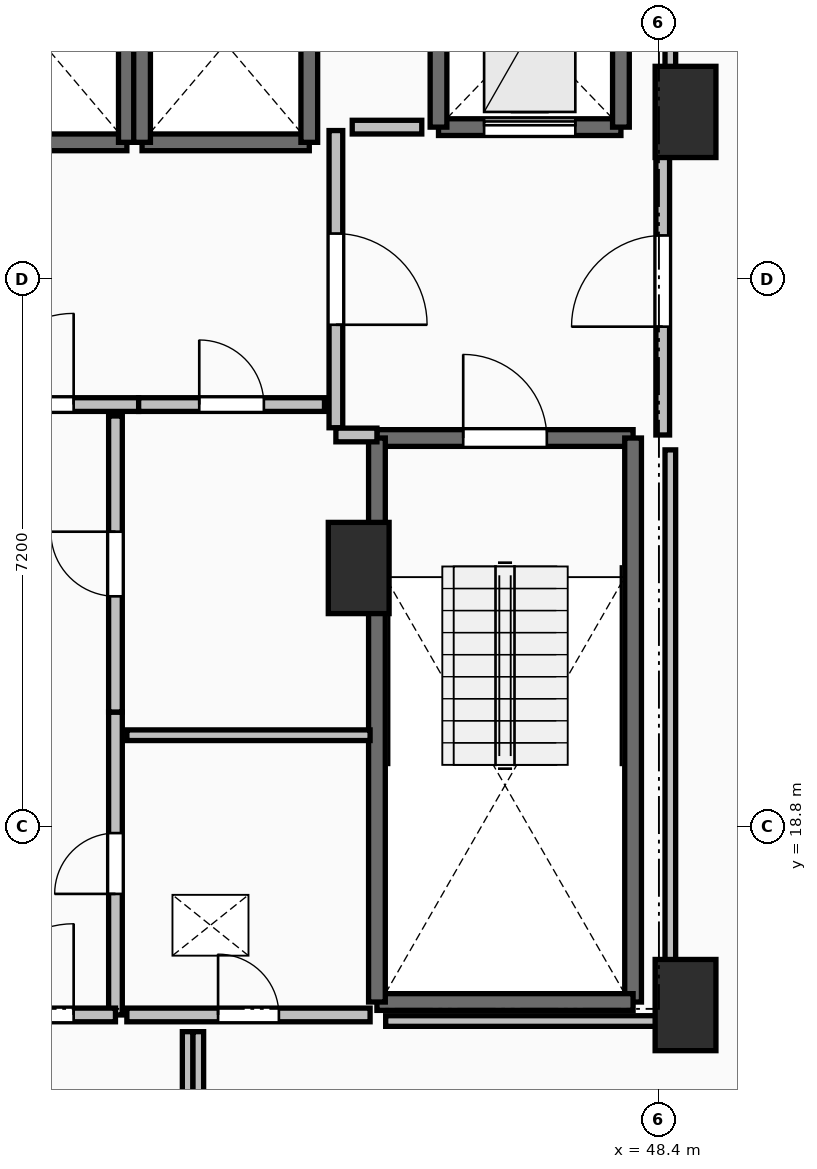
"""IFC4 building model, lengths in metres.
Left out: names, types, materials, properties, quantities, classifications, styles, units other than length and angle.
Written with IfcOpenShell. Run it as: python <this file> out.ifc"""

import sys

from ifc_helpers import new_model, si_unit, direction, frame, frame_2d, origin, origin_2d, place, context, subcontext, project, spatial, rectangle, extrude, element, fill, save


model = new_model("IFC4")
c1 = context("Model", 3, precision=1e-05, world=origin(), true_north=direction((0.0, 1.0)))
c2 = subcontext(c1, "Body", "Model", "MODEL_VIEW")
j1 = project(units=[si_unit("LENGTHUNIT", "METRE"), si_unit("PLANEANGLEUNIT", "RADIAN")], contexts=[c1])
p1 = place(None, origin())
s1 = spatial("IfcSite", under=j1, at=p1, CompositionType="ELEMENT")
p2 = place(p1, origin())
s2 = spatial("IfcBuilding", under=s1, at=p2, CompositionType="ELEMENT")
p3 = place(p2, frame((0.0, 0.0, 136.1)))
s3 = spatial("IfcBuildingStorey", under=s2, at=p3, CompositionType="ELEMENT", Elevation=136.1)
for number, where, z_axis, x_axis in (
    (1, (48.75, 28.2, 0.0), (0.0, 0.0, 1.0), (1.0, 0.0, 0.0)),
    (2, (48.75, 16.45, 0.0), (0.0, 0.0, 1.0), (1.0, 0.0, 0.0)),
    (3, (44.45, 22.2, 0.0), (0.0, 0.0, 1.0), (1.0, 0.0, 0.0)),
):
    element("IfcColumn", number, at=place(p3, frame(where, z_axis=z_axis, x_axis=x_axis)), inside=s3, PredefinedType="PILASTER", context=c2, shape_type="SweptSolid", body=[
        extrude(rectangle(XDim=0.8, YDim=1.2, at=origin_2d()), origin(), (0.0, 0.0, 1.0), 3.5),
    ])
p4 = place(p3, frame((44.69, 23.91, 0.0), z_axis=(0.0, 0.0, 1.0), x_axis=(1.0, 0.0, 0.0)))
e4 = element("IfcWall", 4, at=p4, inside=s3, PredefinedType="SOLIDWALL", context=c2, shape_type="SweptSolid", body=[
    extrude(rectangle(XDim=3.37, YDim=0.22, at=frame_2d((1.685, 0.0))), origin(), (0.0, 0.0, 1.0), 3.24),
])
p5 = place(p4, frame((1.135, 0.0, 0.0)))
e5 = element("IfcOpeningElement", 5, at=p5, cuts=e4, PredefinedType="OPENING", context=c2, shape_type="SweptSolid", body=[
    extrude(rectangle(XDim=1.1, YDim=2.15, at=frame_2d((0.55, 1.075))), frame((0.0, 0.125, 0.0), z_axis=(0.0, -1.0, 0.0), x_axis=(1.0, 0.0, 0.0)), (0.0, 0.0, 1.0), 0.25),
])
p6 = place(p3, frame((48.06, 23.91, 0.0), z_axis=(0.0, 0.0, 1.0), x_axis=(0.0, -1.0, 0.0)))
e6 = element("IfcWall", 6, at=p6, inside=s3, PredefinedType="SOLIDWALL", context=c2, shape_type="SweptSolid", body=[
    extrude(rectangle(XDim=7.42, YDim=0.22, at=frame_2d((3.71, 0.0))), origin(), (0.0, 0.0, 1.0), 3.24),
])
p7 = place(p3, frame((48.06, 16.49, 0.0), z_axis=(0.0, 0.0, 1.0), x_axis=(-1.0, 0.0, 0.0)))
e7 = element("IfcWall", 7, at=p7, inside=s3, PredefinedType="SOLIDWALL", context=c2, shape_type="SweptSolid", body=[
    extrude(rectangle(XDim=3.37, YDim=0.22, at=frame_2d((1.685, 0.0))), origin(), (0.0, 0.0, 1.0), 3.24),
])
p8 = place(p3, frame((44.69, 16.49, 0.0), z_axis=(0.0, 0.0, 1.0), x_axis=(0.0, 1.0, 0.0)))
e8 = element("IfcWall", 8, at=p8, inside=s3, PredefinedType="SOLIDWALL", context=c2, shape_type="SweptSolid", body=[
    extrude(rectangle(XDim=7.42, YDim=0.22, at=frame_2d((3.71, 0.0))), origin(), (0.0, 0.0, 1.0), 3.24),
])
p9 = place(p3, frame((39.2, 27.8, 0.0), z_axis=(0.0, 0.0, 1.0), x_axis=(1.0, 0.0, 0.0)))
e9 = element("IfcWall", 9, at=p9, inside=s3, PredefinedType="SOLIDWALL", context=c2, shape_type="SweptSolid", body=[
    extrude(rectangle(XDim=2.2, YDim=0.22, at=frame_2d((1.1, 0.0))), origin(), (0.0, 0.0, 1.0), 3.24),
])
p10 = place(p3, frame((41.4, 27.8, 0.0), z_axis=(0.0, 0.0, 1.0), x_axis=(0.0, 1.0, 0.0)))
e10 = element("IfcWall", 10, at=p10, inside=s3, PredefinedType="SOLIDWALL", context=c2, shape_type="SweptSolid", body=[
    extrude(rectangle(XDim=2.6, YDim=0.22, at=frame_2d((1.3, 0.0))), origin(), (0.0, 0.0, 1.0), 3.24),
])
p11 = place(p3, frame((41.6, 27.8, 0.0), z_axis=(0.0, 0.0, 1.0), x_axis=(1.0, 0.0, 0.0)))
e11 = element("IfcWall", 11, at=p11, inside=s3, PredefinedType="SOLIDWALL", context=c2, shape_type="SweptSolid", body=[
    extrude(rectangle(XDim=2.2, YDim=0.22, at=frame_2d((1.1, 0.0))), origin(), (0.0, 0.0, 1.0), 3.24),
])
for number, where, z_axis, x_axis in (
    (12, (43.8, 27.8, 0.0), (0.0, 0.0, 1.0), (0.0, 1.0, 0.0)),
    (13, (41.6, 30.4, 0.0), (0.0, 0.0, 1.0), (0.0, -1.0, 0.0)),
):
    element("IfcWall", number, at=place(p3, frame(where, z_axis=z_axis, x_axis=x_axis)), inside=s3, PredefinedType="SOLIDWALL", context=c2, shape_type="SweptSolid", body=[
        extrude(rectangle(XDim=2.6, YDim=0.22, at=frame_2d((1.3, 0.0))), origin(), (0.0, 0.0, 1.0), 3.24),
    ])
p12 = place(p3, frame((45.5, 28.0, 0.0), z_axis=(0.0, 0.0, 1.0), x_axis=(1.0, 0.0, 0.0)))
e14 = element("IfcWall", 14, at=p12, inside=s3, PredefinedType="SHEAR", context=c2, shape_type="SweptSolid", body=[
    extrude(rectangle(XDim=2.4, YDim=0.22, at=frame_2d((1.2, 0.0))), origin(), (0.0, 0.0, 1.0), 3.24),
])
p13 = place(p12, frame((0.6, 0.0, 0.0)))
e15 = element("IfcOpeningElement", 15, at=p13, cuts=e14, PredefinedType="OPENING", context=c2, shape_type="SweptSolid", body=[
    extrude(rectangle(XDim=1.2, YDim=2.2, at=frame_2d((0.6, 1.1))), frame((0.0, 0.125, 0.0), z_axis=(0.0, -1.0, 0.0), x_axis=(1.0, 0.0, 0.0)), (0.0, 0.0, 1.0), 0.25),
])
for number, where, z_axis, x_axis in (
    (16, (47.9, 28.0, 0.0), (0.0, 0.0, 1.0), (0.0, 1.0, 0.0)),
    (17, (45.5, 30.5, 0.0), (0.0, 0.0, 1.0), (0.0, -1.0, 0.0)),
):
    element("IfcWall", number, at=place(p3, frame(where, z_axis=z_axis, x_axis=x_axis)), inside=s3, PredefinedType="SHEAR", context=c2, shape_type="SweptSolid", body=[
        extrude(rectangle(XDim=2.5, YDim=0.22, at=frame_2d((1.25, 0.0))), origin(), (0.0, 0.0, 1.0), 3.24),
    ])
p14 = place(p3, frame((44.15, 27.955, 0.0), z_axis=(0.0, 0.0, 1.0), x_axis=(0.0, -1.0, 0.0)))
e18 = element("IfcWall", 18, at=p14, inside=s3, PredefinedType="PARTITIONING", context=c2, shape_type="SweptSolid", body=[
    extrude(rectangle(XDim=3.91, YDim=0.18, at=frame_2d((1.955, 0.0))), origin(), (0.0, 0.0, 1.0), 3.24),
])
p15 = place(p14, frame((1.355, 0.0, 0.0)))
e19 = element("IfcOpeningElement", 19, at=p15, cuts=e18, PredefinedType="OPENING", context=c2, shape_type="SweptSolid", body=[
    extrude(rectangle(XDim=1.2, YDim=2.15, at=frame_2d((0.6, 1.075))), frame((0.0, 0.105, 0.0), z_axis=(0.0, -1.0, 0.0), x_axis=(1.0, 0.0, 0.0)), (0.0, 0.0, 1.0), 0.21),
])
p16 = place(p3, frame((44.15, 23.95, 0.0), z_axis=(0.0, 0.0, 1.0), x_axis=(1.0, 0.0, 0.0)))
e20 = element("IfcWall", 20, at=p16, inside=s3, PredefinedType="PARTITIONING", context=c2, shape_type="SweptSolid", body=[
    extrude(rectangle(XDim=0.54, YDim=0.18, at=frame_2d((0.27, 0.0))), origin(), (0.0, 0.0, 1.0), 3.24),
])
p17 = place(p3, frame((48.45, 23.95, 0.0), z_axis=(0.0, 0.0, 1.0), x_axis=(0.0, 1.0, 0.0)))
e21 = element("IfcWall", 21, at=p17, inside=s3, PredefinedType="PARTITIONING", context=c2, shape_type="SweptSolid", body=[
    extrude(rectangle(XDim=4.05, YDim=0.18, at=frame_2d((2.025, 0.0))), origin(), (0.0, 0.0, 1.0), 3.24),
])
p18 = place(p17, frame((1.425, 0.0, 0.0)))
e22 = element("IfcOpeningElement", 22, at=p18, cuts=e21, PredefinedType="OPENING", context=c2, shape_type="SweptSolid", body=[
    extrude(rectangle(XDim=1.2, YDim=2.15, at=frame_2d((0.6, 1.075))), frame((0.0, 0.105, 0.0), z_axis=(0.0, -1.0, 0.0), x_axis=(1.0, 0.0, 0.0)), (0.0, 0.0, 1.0), 0.21),
])
p19 = place(p3, frame((38.645, 24.35, 0.0), z_axis=(0.0, 0.0, 1.0), x_axis=(1.0, 0.0, 0.0)))
e23 = element("IfcWall", 23, at=p19, inside=s3, PredefinedType="PARTITIONING", context=c2, shape_type="SweptSolid", body=[
    extrude(rectangle(XDim=2.91, YDim=0.18, at=frame_2d((1.455, 0.0))), origin(), (0.0, 0.0, 1.0), 3.24),
])
p20 = place(p19, frame((0.855, 0.0, 0.0)))
e24 = element("IfcOpeningElement", 24, at=p20, cuts=e23, PredefinedType="OPENING", context=c2, shape_type="SweptSolid", body=[
    extrude(rectangle(XDim=1.2, YDim=2.15, at=frame_2d((0.6, 1.075))), frame((0.0, 0.105, 0.0), z_axis=(0.0, -1.0, 0.0), x_axis=(1.0, 0.0, 0.0)), (0.0, 0.0, 1.0), 0.21),
])
p21 = place(p3, frame((41.555, 24.35, 0.0), z_axis=(0.0, 0.0, 1.0), x_axis=(1.0, 0.0, 0.0)))
e25 = element("IfcWall", 25, at=p21, inside=s3, PredefinedType="PARTITIONING", context=c2, shape_type="SweptSolid", body=[
    extrude(rectangle(XDim=2.445, YDim=0.18, at=frame_2d((1.223, 0.0))), origin(), (0.0, 0.0, 1.0), 3.24),
])
p22 = place(p21, frame((0.798, 0.0, 0.0)))
e26 = element("IfcOpeningElement", 26, at=p22, cuts=e25, PredefinedType="OPENING", context=c2, shape_type="SweptSolid", body=[
    extrude(rectangle(XDim=0.85, YDim=2.1, at=frame_2d((0.425, 1.05))), frame((0.0, 0.105, 0.0), z_axis=(0.0, -1.0, 0.0), x_axis=(1.0, 0.0, 0.0)), (0.0, 0.0, 1.0), 0.21),
])
p23 = place(p3, frame((41.25, 16.32, 0.0), z_axis=(0.0, 0.0, 1.0), x_axis=(0.0, 1.0, 0.0)))
e27 = element("IfcWall", 27, at=p23, inside=s3, PredefinedType="PARTITIONING", context=c2, shape_type="SweptSolid", body=[
    extrude(rectangle(XDim=3.985, YDim=0.18, at=frame_2d((1.992, 0.0))), origin(), (0.0, 0.0, 1.0), 3.24),
])
p24 = place(p23, frame((1.593, 0.0, 0.0)))
e28 = element("IfcOpeningElement", 28, at=p24, cuts=e27, PredefinedType="OPENING", context=c2, shape_type="SweptSolid", body=[
    extrude(rectangle(XDim=0.8, YDim=2.05, at=frame_2d((0.4, 1.025))), frame((0.0, 0.105, 0.0), z_axis=(0.0, -1.0, 0.0), x_axis=(1.0, 0.0, 0.0)), (0.0, 0.0, 1.0), 0.21),
])
p25 = place(p3, frame((41.25, 20.305, 0.0), z_axis=(0.0, 0.0, 1.0), x_axis=(0.0, 1.0, 0.0)))
e29 = element("IfcWall", 29, at=p25, inside=s3, PredefinedType="PARTITIONING", context=c2, shape_type="SweptSolid", body=[
    extrude(rectangle(XDim=3.895, YDim=0.18, at=frame_2d((1.948, 0.0))), origin(), (0.0, 0.0, 1.0), 3.24),
])
p26 = place(p25, frame((1.522, 0.0, 0.0)))
e30 = element("IfcOpeningElement", 30, at=p26, cuts=e29, PredefinedType="OPENING", context=c2, shape_type="SweptSolid", body=[
    extrude(rectangle(XDim=0.85, YDim=2.1, at=frame_2d((0.425, 1.05))), frame((0.0, 0.105, 0.0), z_axis=(0.0, -1.0, 0.0), x_axis=(1.0, 0.0, 0.0)), (0.0, 0.0, 1.0), 0.21),
])
p27 = place(p3, frame((38.95, 16.32, 0.0), z_axis=(0.0, 0.0, 1.0), x_axis=(1.0, 0.0, 0.0)))
e31 = element("IfcWall", 31, at=p27, inside=s3, PredefinedType="PARTITIONING", context=c2, shape_type="SweptSolid", body=[
    extrude(rectangle(XDim=2.3, YDim=0.18, at=frame_2d((1.15, 0.0))), origin(), (0.0, 0.0, 1.0), 3.24),
])
p28 = place(p27, frame((0.55, 0.0, 0.0)))
e32 = element("IfcOpeningElement", 32, at=p28, cuts=e31, PredefinedType="OPENING", context=c2, shape_type="SweptSolid", body=[
    extrude(rectangle(XDim=1.2, YDim=2.15, at=frame_2d((0.6, 1.075))), frame((0.0, 0.105, 0.0), z_axis=(0.0, -1.0, 0.0), x_axis=(1.0, 0.0, 0.0)), (0.0, 0.0, 1.0), 0.21),
])
p29 = place(p3, frame((44.6, 20.0, 0.0), z_axis=(0.0, 0.0, 1.0), x_axis=(-1.0, 0.0, 0.0)))
e33 = element("IfcWall", 33, at=p29, inside=s3, PredefinedType="PARTITIONING", context=c2, shape_type="SweptSolid", body=[
    extrude(rectangle(XDim=3.2, YDim=0.14, at=frame_2d((1.6, 0.0))), origin(), (0.0, 0.0, 1.0), 3.24),
])
p30 = place(p3, frame((41.4, 16.32, 0.0), z_axis=(0.0, 0.0, 1.0), x_axis=(1.0, 0.0, 0.0)))
e34 = element("IfcWall", 34, at=p30, inside=s3, PredefinedType="PARTITIONING", context=c2, shape_type="SweptSolid", body=[
    extrude(rectangle(XDim=3.2, YDim=0.18, at=frame_2d((1.6, 0.0))), origin(), (0.0, 0.0, 1.0), 3.24),
])
p31 = place(p30, frame((1.2, 0.0, 0.0)))
e35 = element("IfcOpeningElement", 35, at=p31, cuts=e34, PredefinedType="OPENING", context=c2, shape_type="SweptSolid", body=[
    extrude(rectangle(XDim=0.8, YDim=2.05, at=frame_2d((0.4, 1.025))), frame((0.0, 0.105, 0.0), z_axis=(0.0, -1.0, 0.0), x_axis=(1.0, 0.0, 0.0)), (0.0, 0.0, 1.0), 0.21),
])
p32 = place(p3, frame((45.28, 28.0, 0.0), z_axis=(0.0, 0.0, 1.0), x_axis=(-1.0, 0.0, 0.0)))
e36 = element("IfcWall", 36, at=p32, inside=s3, PredefinedType="PARTITIONING", context=c2, shape_type="SweptSolid", body=[
    extrude(rectangle(XDim=0.915, YDim=0.18, at=frame_2d((0.458, 0.0))), origin(), (0.0, 0.0, 1.0), 3.24),
])
p33 = place(p3, frame((48.55, 16.24, 0.0), z_axis=(0.0, 0.0, 1.0), x_axis=(0.0, 1.0, 0.0)))
e37 = element("IfcWall", 37, at=p33, inside=s3, PredefinedType="PARTITIONING", context=c2, shape_type="SweptSolid", body=[
    extrude(rectangle(XDim=7.514, YDim=0.14, at=frame_2d((3.757, 0.0))), origin(), (0.0, 0.0, 1.0), 2.432),
])
p34 = place(p3, frame((48.55, 28.196, 0.0), z_axis=(0.0, 0.0, 1.0), x_axis=(0.0, 1.0, 0.0)))
e38 = element("IfcWall", 38, at=p34, inside=s3, PredefinedType="PARTITIONING", context=c2, shape_type="SweptSolid", body=[
    extrude(rectangle(XDim=5.254, YDim=0.14, at=frame_2d((2.627, 0.0))), origin(), (0.0, 0.0, 1.0), 2.432),
])
for number, where, z_axis, x_axis in (
    (39, (42.2, 16.1, 0.0), (0.0, 0.0, 1.0), (0.0, -1.0, 0.0)),
    (40, (42.34, 14.27, 0.0), (0.0, 0.0, 1.0), (0.0, 1.0, 0.0)),
):
    element("IfcWall", number, at=place(p3, frame(where, z_axis=z_axis, x_axis=x_axis)), inside=s3, PredefinedType="PARTITIONING", context=c2, shape_type="SweptSolid", body=[
        extrude(rectangle(XDim=1.83, YDim=0.14, at=frame_2d((0.915, 0.0))), origin(), (0.0, 0.0, 1.0), 3.24),
    ])
p35 = place(p3, frame((44.805, 16.24, 0.0), z_axis=(0.0, 0.0, 1.0), x_axis=(1.0, 0.0, 0.0)))
e41 = element("IfcWall", 41, at=p35, inside=s3, PredefinedType="PARTITIONING", context=c2, shape_type="SweptSolid", body=[
    extrude(rectangle(XDim=3.745, YDim=0.14, at=frame_2d((1.873, 0.0))), origin(), (0.0, 0.0, 1.0), 2.432),
])
p36 = place(p5, origin())
e42 = element("IfcDoor", 42, at=p36, inside=s3, OperationType="SINGLE_SWING_LEFT", PredefinedType="DOOR", context=c2, shape_type="SweptSolid", body=[
    extrude(rectangle(XDim=1.1, YDim=2.15, at=frame_2d((0.55, 1.075))), frame((0.0, 0.025, 0.0), z_axis=(0.0, -1.0, 0.0), x_axis=(1.0, 0.0, 0.0)), (0.0, 0.0, 1.0), 0.05),
])
fill(e5, e42)
p37 = place(p13, origin())
e43 = element("IfcDoor", 43, at=p37, inside=s3, OperationType="SLIDING_TO_LEFT", PredefinedType="DOOR", context=c2, shape_type="SweptSolid", body=[
    extrude(rectangle(XDim=1.2, YDim=2.2, at=frame_2d((0.6, 1.1))), frame((0.0, 0.025, 0.0), z_axis=(0.0, -1.0, 0.0), x_axis=(1.0, 0.0, 0.0)), (0.0, 0.0, 1.0), 0.05),
])
fill(e15, e43)
p38 = place(p15, origin())
e44 = element("IfcDoor", 44, at=p38, inside=s3, OperationType="SINGLE_SWING_RIGHT", PredefinedType="DOOR", context=c2, shape_type="SweptSolid", body=[
    extrude(rectangle(XDim=1.2, YDim=2.15, at=frame_2d((0.6, 1.075))), frame((0.0, 0.025, 0.0), z_axis=(0.0, -1.0, 0.0), x_axis=(1.0, 0.0, 0.0)), (0.0, 0.0, 1.0), 0.05),
])
fill(e19, e44)
p39 = place(p18, origin())
e45 = element("IfcDoor", 45, at=p39, inside=s3, OperationType="SINGLE_SWING_LEFT", PredefinedType="DOOR", context=c2, shape_type="SweptSolid", body=[
    extrude(rectangle(XDim=1.2, YDim=2.15, at=frame_2d((0.6, 1.075))), frame((0.0, 0.025, 0.0), z_axis=(0.0, -1.0, 0.0), x_axis=(1.0, 0.0, 0.0)), (0.0, 0.0, 1.0), 0.05),
])
fill(e22, e45)
p40 = place(p20, origin())
e46 = element("IfcDoor", 46, at=p40, inside=s3, OperationType="SINGLE_SWING_RIGHT", PredefinedType="DOOR", context=c2, shape_type="SweptSolid", body=[
    extrude(rectangle(XDim=1.2, YDim=2.15, at=frame_2d((0.6, 1.075))), frame((0.0, 0.025, 0.0), z_axis=(0.0, -1.0, 0.0), x_axis=(1.0, 0.0, 0.0)), (0.0, 0.0, 1.0), 0.05),
])
fill(e24, e46)
p41 = place(p22, origin())
e47 = element("IfcDoor", 47, at=p41, inside=s3, OperationType="SINGLE_SWING_LEFT", PredefinedType="DOOR", context=c2, shape_type="SweptSolid", body=[
    extrude(rectangle(XDim=0.85, YDim=2.1, at=frame_2d((0.425, 1.05))), frame((0.0, 0.025, 0.0), z_axis=(0.0, -1.0, 0.0), x_axis=(1.0, 0.0, 0.0)), (0.0, 0.0, 1.0), 0.05),
])
fill(e26, e47)
p42 = place(p24, origin())
e48 = element("IfcDoor", 48, at=p42, inside=s3, OperationType="SINGLE_SWING_LEFT", PredefinedType="DOOR", context=c2, shape_type="SweptSolid", body=[
    extrude(rectangle(XDim=0.8, YDim=2.05, at=frame_2d((0.4, 1.025))), frame((0.0, 0.025, 0.0), z_axis=(0.0, -1.0, 0.0), x_axis=(1.0, 0.0, 0.0)), (0.0, 0.0, 1.0), 0.05),
])
fill(e28, e48)
p43 = place(p26, origin())
e49 = element("IfcDoor", 49, at=p43, inside=s3, OperationType="SINGLE_SWING_RIGHT", PredefinedType="DOOR", context=c2, shape_type="SweptSolid", body=[
    extrude(rectangle(XDim=0.85, YDim=2.1, at=frame_2d((0.425, 1.05))), frame((0.0, 0.025, 0.0), z_axis=(0.0, -1.0, 0.0), x_axis=(1.0, 0.0, 0.0)), (0.0, 0.0, 1.0), 0.05),
])
fill(e30, e49)
p44 = place(p28, origin())
e50 = element("IfcDoor", 50, at=p44, inside=s3, OperationType="SINGLE_SWING_RIGHT", PredefinedType="DOOR", context=c2, shape_type="SweptSolid", body=[
    extrude(rectangle(XDim=1.2, YDim=2.15, at=frame_2d((0.6, 1.075))), frame((0.0, 0.025, 0.0), z_axis=(0.0, -1.0, 0.0), x_axis=(1.0, 0.0, 0.0)), (0.0, 0.0, 1.0), 0.05),
])
fill(e32, e50)
p45 = place(p31, origin())
e51 = element("IfcDoor", 51, at=p45, inside=s3, OperationType="SINGLE_SWING_LEFT", PredefinedType="DOOR", context=c2, shape_type="SweptSolid", body=[
    extrude(rectangle(XDim=0.8, YDim=2.05, at=frame_2d((0.4, 1.025))), frame((0.0, 0.025, 0.0), z_axis=(0.0, -1.0, 0.0), x_axis=(1.0, 0.0, 0.0)), (0.0, 0.0, 1.0), 0.05),
])
fill(e35, e51)
save(model, sys.argv[1])
